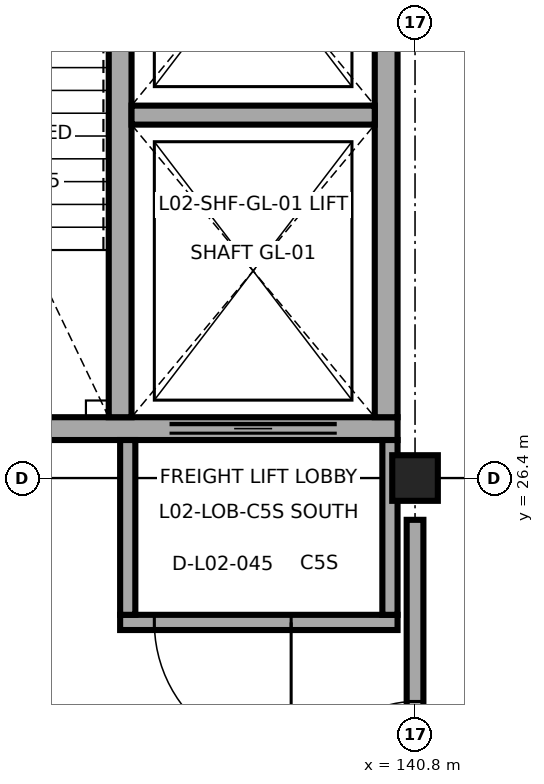
"""IFC4 building model, lengths in metres.
Left out: names, types, materials, properties, quantities, classifications, styles, units other than length and angle.
Written with IfcOpenShell. Run it as: python <this file> out.ifc"""

import sys

from ifc_helpers import new_model, si_unit, direction, frame, frame_2d, origin, origin_2d, place, context, subcontext, project, spatial, rectangle, extrude, element, fill, save


model = new_model("IFC4")
c1 = context("Model", 3, precision=1e-05, world=origin(), true_north=direction((0.0, 1.0)))
c2 = subcontext(c1, "Body", "Model", "MODEL_VIEW")
j1 = project(units=[si_unit("LENGTHUNIT", "METRE"), si_unit("PLANEANGLEUNIT", "RADIAN")], contexts=[c1])
p1 = place(None, origin())
s1 = spatial("IfcSite", under=j1, at=p1, CompositionType="ELEMENT")
p2 = place(p1, origin())
s2 = spatial("IfcBuilding", under=s1, at=p2, CompositionType="ELEMENT")
p3 = place(p2, frame((0.0, 0.0, 12.9)))
s3 = spatial("IfcBuildingStorey", under=s2, at=p3, CompositionType="ELEMENT", Elevation=12.9)
p4 = place(p3, frame((140.8, 26.4, 0.0), z_axis=(0.0, 0.0, 1.0), x_axis=(1.0, 0.0, 0.0)))
e1 = element("IfcColumn", 1, at=p4, inside=s3, PredefinedType="COLUMN", context=c2, shape_type="SweptSolid", body=[
    extrude(rectangle(XDim=0.6, YDim=0.6, at=origin_2d()), origin(), (0.0, 0.0, 1.0), 4.5),
])
p5 = place(p3, frame((132.63, 27.05, 0.0), z_axis=(0.0, 0.0, 1.0), x_axis=(1.0, 0.0, 0.0)))
e2 = element("IfcWall", 2, at=p5, inside=s3, PredefinedType="SHEAR", context=c2, shape_type="SweptSolid", body=[
    extrude(rectangle(XDim=7.94, YDim=0.3, at=frame_2d((3.97, 0.0))), origin(), (0.0, 0.0, 1.0), 4.25),
])
p6 = place(p5, frame((4.94, 0.0, 0.0)))
e3 = element("IfcOpeningElement", 3, at=p6, cuts=e2, PredefinedType="OPENING", context=c2, shape_type="SweptSolid", body=[
    extrude(rectangle(XDim=2.2, YDim=2.6, at=frame_2d((1.1, 1.3))), frame((0.0, 0.16, 0.0), z_axis=(0.0, -1.0, 0.0), x_axis=(1.0, 0.0, 0.0)), (0.0, 0.0, 1.0), 0.32),
])
for number, where, z_axis, x_axis in (
    (4, (140.42, 27.2, 0.0), (0.0, 0.0, 1.0), (0.0, 1.0, 0.0)),
    (5, (136.92, 27.2, 0.0), (0.0, 0.0, 1.0), (0.0, 1.0, 0.0)),
):
    element("IfcWall", number, at=place(p3, frame(where, z_axis=z_axis, x_axis=x_axis)), inside=s3, PredefinedType="SHEAR", context=c2, shape_type="SweptSolid", body=[
        extrude(rectangle(XDim=8.0, YDim=0.3, at=frame_2d((4.0, 0.0))), origin(), (0.0, 0.0, 1.0), 4.25),
    ])
p7 = place(p3, frame((137.07, 31.175, 0.0), z_axis=(0.0, 0.0, 1.0), x_axis=(1.0, 0.0, 0.0)))
e6 = element("IfcWall", 6, at=p7, inside=s3, PredefinedType="SHEAR", context=c2, shape_type="SweptSolid", body=[
    extrude(rectangle(XDim=3.2, YDim=0.25, at=frame_2d((1.6, 0.0))), origin(), (0.0, 0.0, 1.0), 4.25),
])
p8 = place(p3, frame((140.57, 24.5, 0.0), z_axis=(0.0, 0.0, 1.0), x_axis=(-1.0, 0.0, 0.0)))
e7 = element("IfcWall", 7, at=p8, inside=s3, PredefinedType="SOLIDWALL", context=c2, shape_type="SweptSolid", body=[
    extrude(rectangle(XDim=3.65, YDim=0.2, at=frame_2d((1.825, 0.0))), origin(), (0.0, 0.0, 1.0), 4.235),
])
p9 = place(p8, frame((1.4, 0.0, 0.0)))
e8 = element("IfcOpeningElement", 8, at=p9, cuts=e7, PredefinedType="OPENING", context=c2, shape_type="SweptSolid", body=[
    extrude(rectangle(XDim=1.8, YDim=2.2, at=frame_2d((0.9, 1.1))), frame((0.0, 0.11, 0.0), z_axis=(0.0, -1.0, 0.0), x_axis=(1.0, 0.0, 0.0)), (0.0, 0.0, 1.0), 0.22),
])
for number, where, z_axis, x_axis in (
    (9, (137.02, 24.6, 0.0), (0.0, 0.0, 1.0), (0.0, 1.0, 0.0)),
    (10, (140.47, 26.9, 0.0), (0.0, 0.0, 1.0), (0.0, -1.0, 0.0)),
):
    element("IfcWall", number, at=place(p3, frame(where, z_axis=z_axis, x_axis=x_axis)), inside=s3, PredefinedType="SOLIDWALL", context=c2, shape_type="SweptSolid", body=[
        extrude(rectangle(XDim=2.3, YDim=0.2, at=frame_2d((1.15, 0.0))), origin(), (0.0, 0.0, 1.0), 3.682),
    ])
p10 = place(p3, frame((140.8, 19.75, 0.0), z_axis=(0.0, 0.0, 1.0), x_axis=(0.0, 1.0, 0.0)))
e11 = element("IfcWall", 11, at=p10, inside=s3, PredefinedType="PARTITIONING", context=c2, shape_type="SweptSolid", body=[
    extrude(rectangle(XDim=6.1, YDim=0.22, at=frame_2d((3.05, 0.0))), origin(), (0.0, 0.0, 1.0), 3.782),
])
p11 = place(p10, frame((2.39, 0.0, 0.0)))
e12 = element("IfcOpeningElement", 12, at=p11, cuts=e11, PredefinedType="OPENING", context=c2, shape_type="SweptSolid", body=[
    extrude(rectangle(XDim=1.32, YDim=2.2, at=frame_2d((0.66, 1.1))), frame((0.0, 0.12, 0.0), z_axis=(0.0, -1.0, 0.0), x_axis=(1.0, 0.0, 0.0)), (0.0, 0.0, 1.0), 0.24),
])
p12 = place(p6, origin())
e13 = element("IfcDoor", 13, at=p12, inside=s3, OperationType="SLIDING_TO_LEFT", PredefinedType="DOOR", context=c2, shape_type="SweptSolid", body=[
    extrude(rectangle(XDim=2.2, YDim=2.6, at=frame_2d((1.1, 1.3))), frame((0.0, 0.025, 0.0), z_axis=(0.0, -1.0, 0.0), x_axis=(1.0, 0.0, 0.0)), (0.0, 0.0, 1.0), 0.05),
])
fill(e3, e13)
p13 = place(p9, origin())
e14 = element("IfcDoor", 14, at=p13, inside=s3, OperationType="DOUBLE_DOOR_SINGLE_SWING", PredefinedType="DOOR", context=c2, shape_type="SweptSolid", body=[
    extrude(rectangle(XDim=1.8, YDim=2.2, at=frame_2d((0.9, 1.1))), frame((0.0, 0.025, 0.0), z_axis=(0.0, -1.0, 0.0), x_axis=(1.0, 0.0, 0.0)), (0.0, 0.0, 1.0), 0.05),
])
fill(e8, e14)
p14 = place(p11, origin())
e15 = element("IfcDoor", 15, at=p14, inside=s3, OperationType="SINGLE_SWING_LEFT", PredefinedType="DOOR", context=c2, shape_type="SweptSolid", body=[
    extrude(rectangle(XDim=1.32, YDim=2.2, at=frame_2d((0.66, 1.1))), frame((0.0, 0.025, 0.0), z_axis=(0.0, -1.0, 0.0), x_axis=(1.0, 0.0, 0.0)), (0.0, 0.0, 1.0), 0.05),
])
fill(e12, e15)
save(model, sys.argv[1])
